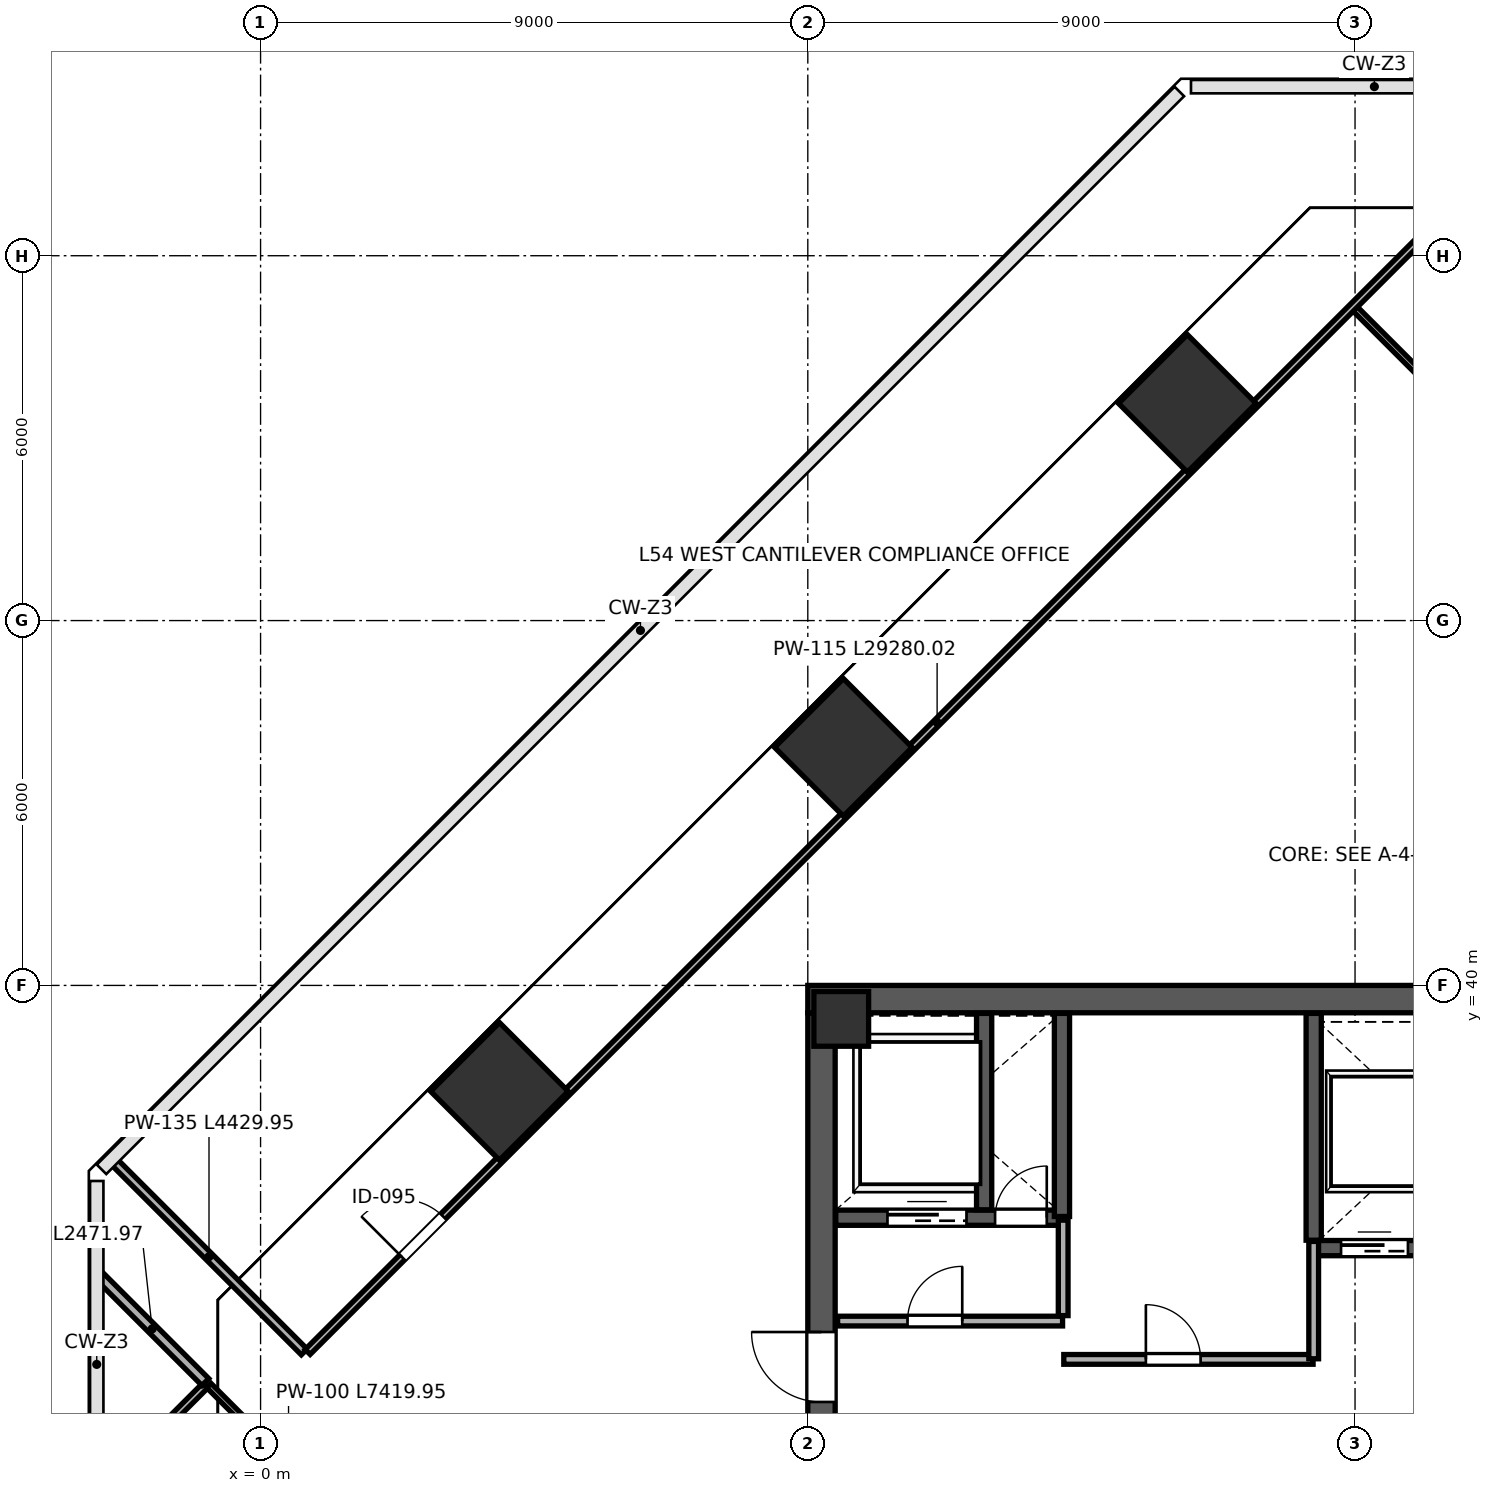
"""IFC4 building model, lengths in metres.
Left out: names, types, materials, properties, quantities, classifications, styles, units other than length and angle.
Written with IfcOpenShell. Run it as: python <this file> out.ifc"""

import sys

from ifc_helpers import new_model, si_unit, direction, frame, frame_2d, origin, origin_2d, place, context, subcontext, project, spatial, rectangle, extrude, source, transform, mapped, element, fill, save


model = new_model("IFC4")
c1 = context("Model", 3, precision=1e-05, world=origin(), true_north=direction((0.0, 1.0)))
c2 = subcontext(c1, "Body", "Model", "MODEL_VIEW")
j1 = project(units=[si_unit("LENGTHUNIT", "METRE"), si_unit("PLANEANGLEUNIT", "RADIAN")], contexts=[c1])
p1 = place(None, origin())
s1 = spatial("IfcSite", under=j1, at=p1, CompositionType="ELEMENT")
p2 = place(p1, origin())
s2 = spatial("IfcBuilding", under=s1, at=p2, CompositionType="ELEMENT")
p3 = place(p2, frame((0.0, 0.0, 241.6)))
s3 = spatial("IfcBuildingStorey", under=s2, at=p3, CompositionType="ELEMENT", Elevation=241.6)
m1 = source(origin(), c2, "Body", "SweptSolid", [
    extrude(rectangle(XDim=0.9, YDim=0.9, at=origin_2d()), origin(), (0.0, 0.0, 1.0), 4.198),
])
p4 = place(p3, frame((9.55, 39.45, 0.001), z_axis=(0.0, 0.0, 1.0), x_axis=(1.0, 0.0, 0.0)))
e1 = element("IfcColumn", 1, at=p4, inside=s3, PredefinedType="COLUMN", context=c2, shape_type="MappedRepresentation", body=[
    mapped(m1, transform((0.0, 0.0, 0.0), scale=1.0)),
])
m2 = source(origin(), c2, "Body", "SweptSolid", [
    extrude(rectangle(XDim=1.6, YDim=1.6, at=origin_2d()), origin(), (0.0, 0.0, 1.0), 4.198),
])
for number, where, z_axis, x_axis in (
    (2, (3.928, 38.258, 0.001), (0.0, 0.0, 1.0), (-0.707, 0.707, 0.0)),
    (3, (9.585, 43.915, 0.001), (0.0, 0.0, 1.0), (-0.707, 0.707, 0.0)),
    (4, (15.242, 49.572, 0.001), (0.0, 0.0, 1.0), (-0.707, 0.707, 0.0)),
):
    element("IfcColumn", number, at=place(p3, frame(where, z_axis=z_axis, x_axis=x_axis)), inside=s3, PredefinedType="COLUMN", context=c2, shape_type="MappedRepresentation", body=[
        mapped(m2, transform((0.0, 0.0, 0.0), scale=1.0)),
    ])
p5 = place(p3, frame((9.225, 24.45, 0.0), z_axis=(0.0, 0.0, 1.0), x_axis=(0.0, 1.0, 0.0)))
e5 = element("IfcWall", 5, at=p5, inside=s3, PredefinedType="SHEAR", context=c2, shape_type="SweptSolid", body=[
    extrude(rectangle(XDim=15.1, YDim=0.45, at=frame_2d((7.55, 0.0))), origin(), (0.0, 0.0, 1.0), 3.96),
])
p6 = place(p5, frame((8.7, 0.0, 0.0)))
e6 = element("IfcOpeningElement", 6, at=p6, cuts=e5, PredefinedType="OPENING", context=c2, shape_type="SweptSolid", body=[
    extrude(rectangle(XDim=1.15, YDim=2.2, at=frame_2d((0.575, 1.1))), frame((0.0, 0.235, 0.0), z_axis=(0.0, -1.0, 0.0), x_axis=(1.0, 0.0, 0.0)), (0.0, 0.0, 1.0), 0.47),
])
p7 = place(p3, frame((9.0, 39.775, 0.0), z_axis=(0.0, 0.0, 1.0), x_axis=(1.0, 0.0, 0.0)))
e7 = element("IfcWall", 7, at=p7, inside=s3, PredefinedType="SHEAR", context=c2, shape_type="SweptSolid", body=[
    extrude(rectangle(XDim=18.0, YDim=0.45, at=frame_2d((9.0, 0.0))), origin(), (0.0, 0.0, 1.0), 3.96),
])
p8 = place(p3, frame((9.46, 36.18, 0.0), z_axis=(0.0, 0.0, 1.0), x_axis=(1.0, 0.0, 0.0)))
e8 = element("IfcWall", 8, at=p8, inside=s3, PredefinedType="SHEAR", context=c2, shape_type="SweptSolid", body=[
    extrude(rectangle(XDim=3.79, YDim=0.25, at=frame_2d((1.895, 0.0))), origin(), (0.0, 0.0, 1.0), 3.96),
])
p9 = place(p8, frame((2.62, 0.0, 0.0)))
e9 = element("IfcOpeningElement", 9, at=p9, cuts=e8, PredefinedType="OPENING", context=c2, shape_type="SweptSolid", body=[
    extrude(rectangle(XDim=0.85, YDim=2.1, at=frame_2d((0.425, 1.05))), frame((0.0, 0.135, 0.0), z_axis=(0.0, -1.0, 0.0), x_axis=(1.0, 0.0, 0.0)), (0.0, 0.0, 1.0), 0.27),
])
p10 = place(p8, frame((0.85, 0.0, 0.0)))
e10 = element("IfcOpeningElement", 10, at=p10, cuts=e8, PredefinedType="OPENING", context=c2, shape_type="SweptSolid", body=[
    extrude(rectangle(XDim=1.3, YDim=2.25, at=frame_2d((0.65, 1.125))), frame((0.0, 0.135, 0.0), z_axis=(0.0, -1.0, 0.0), x_axis=(1.0, 0.0, 0.0)), (0.0, 0.0, 1.0), 0.27),
])
p11 = place(p3, frame((11.9, 36.31, 0.0), z_axis=(0.0, 0.0, 1.0), x_axis=(0.0, 1.0, 0.0)))
e11 = element("IfcWall", 11, at=p11, inside=s3, PredefinedType="SHEAR", context=c2, shape_type="SweptSolid", body=[
    extrude(rectangle(XDim=3.23, YDim=0.25, at=frame_2d((1.615, 0.0))), origin(), (0.0, 0.0, 1.0), 3.96),
])
p12 = place(p3, frame((13.18, 36.2, 0.0), z_axis=(0.0, 0.0, 1.0), x_axis=(0.0, 1.0, 0.0)))
e12 = element("IfcWall", 12, at=p12, inside=s3, PredefinedType="SHEAR", context=c2, shape_type="SweptSolid", body=[
    extrude(rectangle(XDim=3.34, YDim=0.25, at=frame_2d((1.67, 0.0))), origin(), (0.0, 0.0, 1.0), 3.96),
])
p13 = place(p3, frame((17.32, 35.68, 0.0), z_axis=(0.0, 0.0, 1.0), x_axis=(1.0, 0.0, 0.0)))
e13 = element("IfcWall", 13, at=p13, inside=s3, PredefinedType="SHEAR", context=c2, shape_type="SweptSolid", body=[
    extrude(rectangle(XDim=3.87, YDim=0.25, at=frame_2d((1.935, 0.0))), origin(), (0.0, 0.0, 1.0), 3.96),
])
p14 = place(p13, frame((0.45, 0.0, 0.0)))
e14 = element("IfcOpeningElement", 14, at=p14, cuts=e13, PredefinedType="OPENING", context=c2, shape_type="SweptSolid", body=[
    extrude(rectangle(XDim=1.1, YDim=2.2, at=frame_2d((0.55, 1.1))), frame((0.0, 0.135, 0.0), z_axis=(0.0, -1.0, 0.0), x_axis=(1.0, 0.0, 0.0)), (0.0, 0.0, 1.0), 0.27),
])
p15 = place(p13, frame((2.35, 0.0, 0.0)))
e15 = element("IfcOpeningElement", 15, at=p15, cuts=e13, PredefinedType="OPENING", context=c2, shape_type="SweptSolid", body=[
    extrude(rectangle(XDim=1.1, YDim=2.2, at=frame_2d((0.55, 1.1))), frame((0.0, 0.135, 0.0), z_axis=(0.0, -1.0, 0.0), x_axis=(1.0, 0.0, 0.0)), (0.0, 0.0, 1.0), 0.27),
])
p16 = place(p3, frame((17.32, 35.81, 0.0), z_axis=(0.0, 0.0, 1.0), x_axis=(0.0, 1.0, 0.0)))
e16 = element("IfcWall", 16, at=p16, inside=s3, PredefinedType="SHEAR", context=c2, shape_type="SweptSolid", body=[
    extrude(rectangle(XDim=3.73, YDim=0.25, at=frame_2d((1.865, 0.0))), origin(), (0.0, 0.0, 1.0), 3.96),
])
p17 = place(p3, frame((9.49, 34.48, 0.0), z_axis=(0.0, 0.0, 1.0), x_axis=(1.0, 0.0, 0.0)))
e17 = element("IfcWall", 17, at=p17, inside=s3, PredefinedType="PARTITIONING", context=c2, shape_type="SweptSolid", body=[
    extrude(rectangle(XDim=3.7, YDim=0.16, at=frame_2d((1.85, 0.0))), origin(), (0.0, 0.0, 1.0), 3.96),
])
p18 = place(p17, frame((1.15, 0.0, 0.0)))
e18 = element("IfcOpeningElement", 18, at=p18, cuts=e17, PredefinedType="OPENING", context=c2, shape_type="SweptSolid", body=[
    extrude(rectangle(XDim=0.9, YDim=2.15, at=frame_2d((0.45, 1.075))), frame((0.0, 0.09, 0.0), z_axis=(0.0, -1.0, 0.0), x_axis=(1.0, 0.0, 0.0)), (0.0, 0.0, 1.0), 0.18),
])
p19 = place(p3, frame((13.2, 34.57, 0.0), z_axis=(0.0, 0.0, 1.0), x_axis=(0.0, 1.0, 0.0)))
e19 = element("IfcWall", 19, at=p19, inside=s3, PredefinedType="PARTITIONING", context=c2, shape_type="SweptSolid", body=[
    extrude(rectangle(XDim=1.57, YDim=0.16, at=frame_2d((0.785, 0.0))), origin(), (0.0, 0.0, 1.0), 3.96),
])
p20 = place(p3, frame((13.21, 33.85, 0.0), z_axis=(0.0, 0.0, 1.0), x_axis=(1.0, 0.0, 0.0)))
e20 = element("IfcWall", 20, at=p20, inside=s3, PredefinedType="PARTITIONING", context=c2, shape_type="SweptSolid", body=[
    extrude(rectangle(XDim=4.1, YDim=0.16, at=frame_2d((2.05, 0.0))), origin(), (0.0, 0.0, 1.0), 3.96),
])
p21 = place(p20, frame((1.35, 0.0, 0.0)))
e21 = element("IfcOpeningElement", 21, at=p21, cuts=e20, PredefinedType="OPENING", context=c2, shape_type="SweptSolid", body=[
    extrude(rectangle(XDim=0.9, YDim=2.15, at=frame_2d((0.45, 1.075))), frame((0.0, 0.09, 0.0), z_axis=(0.0, -1.0, 0.0), x_axis=(1.0, 0.0, 0.0)), (0.0, 0.0, 1.0), 0.18),
])
p22 = place(p3, frame((17.32, 33.86, 0.0), z_axis=(0.0, 0.0, 1.0), x_axis=(0.0, 1.0, 0.0)))
e22 = element("IfcWall", 22, at=p22, inside=s3, PredefinedType="PARTITIONING", context=c2, shape_type="SweptSolid", body=[
    extrude(rectangle(XDim=1.93, YDim=0.16, at=frame_2d((0.965, 0.0))), origin(), (0.0, 0.0, 1.0), 3.96),
])
p23 = place(p3, frame((-2.656, 31.673, 0.0), z_axis=(0.0, 0.0, 1.0), x_axis=(0.707106781187, 0.707106781187, 0.0)))
e23 = element("IfcWall", 23, at=p23, inside=s3, PredefinedType="PARTITIONING", context=c2, shape_type="SweptSolid", body=[
    extrude(rectangle(XDim=2.472, YDim=0.115, at=frame_2d((1.236, 0.0))), origin(), (0.0, 0.0, 1.0), 3.96),
])
p24 = place(p3, frame((-2.656, 35.226, 0.0), z_axis=(0.0, 0.0, 1.0), x_axis=(0.707106781187, -0.707106781187, 0.0)))
e24 = element("IfcWall", 24, at=p24, inside=s3, PredefinedType="PARTITIONING", context=c2, shape_type="SweptSolid", body=[
    extrude(rectangle(XDim=2.472, YDim=0.16, at=frame_2d((1.236, 0.0))), origin(), (0.0, 0.0, 1.0), 3.96),
])
p25 = place(p3, frame((-0.852, 33.421, 0.0), z_axis=(0.0, 0.0, 1.0), x_axis=(0.707090329382, -0.707123232608, 0.0)))
e25 = element("IfcWall", 25, at=p25, inside=s3, PredefinedType="PARTITIONING", context=c2, shape_type="SweptSolid", body=[
    extrude(rectangle(XDim=7.42, YDim=0.1, at=frame_2d((3.71, 0.0))), origin(), (0.0, 0.0, 1.0), 3.96),
])
p26 = place(p25, frame((2.9, 0.0, 0.0)))
e26 = element("IfcOpeningElement", 26, at=p26, cuts=e25, PredefinedType="OPENING", context=c2, shape_type="SweptSolid", body=[
    extrude(rectangle(XDim=0.9, YDim=2.15, at=frame_2d((0.45, 1.075))), frame((0.0, 0.06, 0.0), z_axis=(0.0, -1.0, 0.0), x_axis=(1.0, 0.0, 0.0)), (0.0, 0.0, 1.0), 0.12),
])
p27 = place(p25, frame((5.0, 0.0, 0.0)))
e27 = element("IfcOpeningElement", 27, at=p27, cuts=e25, PredefinedType="OPENING", context=c2, shape_type="SweptSolid", body=[
    extrude(rectangle(XDim=0.95, YDim=2.15, at=frame_2d((0.475, 1.075))), frame((0.0, 0.06, 0.0), z_axis=(0.0, -1.0, 0.0), x_axis=(1.0, 0.0, 0.0)), (0.0, 0.0, 1.0), 0.12),
])
p28 = place(p3, frame((17.993, 51.134, 0.0), z_axis=(0.0, 0.0, 1.0), x_axis=(0.707106781187, -0.707106781187, 0.0)))
e28 = element("IfcWall", 28, at=p28, inside=s3, PredefinedType="PARTITIONING", context=c2, shape_type="SweptSolid", body=[
    extrude(rectangle(XDim=22.27, YDim=0.1, at=frame_2d((11.135, 0.0))), origin(), (0.0, 0.0, 1.0), 3.96),
])
p29 = place(p28, frame((10.8, 0.0, 0.0)))
e29 = element("IfcOpeningElement", 29, at=p29, cuts=e28, PredefinedType="OPENING", context=c2, shape_type="SweptSolid", body=[
    extrude(rectangle(XDim=0.95, YDim=2.15, at=frame_2d((0.475, 1.075))), frame((0.0, 0.06, 0.0), z_axis=(0.0, -1.0, 0.0), x_axis=(1.0, 0.0, 0.0)), (0.0, 0.0, 1.0), 0.12),
])
p30 = place(p3, frame((-2.414, 37.105, 0.0), z_axis=(0.0, 0.0, 1.0), x_axis=(0.707106781187, -0.707106781187, 0.0)))
e30 = element("IfcWall", 30, at=p30, inside=s3, PredefinedType="PARTITIONING", context=c2, shape_type="SweptSolid", body=[
    extrude(rectangle(XDim=4.43, YDim=0.135, at=frame_2d((2.215, 0.0))), origin(), (0.0, 0.0, 1.0), 3.96),
])
p31 = place(p3, frame((0.775, 33.973, 0.0), z_axis=(0.0, 0.0, 1.0), x_axis=(0.707106781187, 0.707106781187, 0.0)))
e31 = element("IfcWall", 31, at=p31, inside=s3, PredefinedType="PARTITIONING", context=c2, shape_type="SweptSolid", body=[
    extrude(rectangle(XDim=29.28, YDim=0.115, at=frame_2d((14.64, 0.0))), origin(), (0.0, 0.0, 1.0), 3.96),
])
p32 = place(p31, frame((2.2, 0.0, 0.0)))
e32 = element("IfcOpeningElement", 32, at=p32, cuts=e31, PredefinedType="OPENING", context=c2, shape_type="SweptSolid", body=[
    extrude(rectangle(XDim=0.95, YDim=2.15, at=frame_2d((0.475, 1.075))), frame((0.0, 0.067, 0.0), z_axis=(0.0, -1.0, 0.0), x_axis=(1.0, 0.0, 0.0)), (0.0, 0.0, 1.0), 0.135),
])
m3 = source(origin(), c2, "Body", "SweptSolid", [
    extrude(rectangle(XDim=1.15, YDim=2.2, at=frame_2d((0.575, 1.1))), frame((0.0, 0.025, 0.0), z_axis=(0.0, -1.0, 0.0), x_axis=(1.0, 0.0, 0.0)), (0.0, 0.0, 1.0), 0.05),
])
p33 = place(p6, origin())
e33 = element("IfcDoor", 33, at=p33, inside=s3, OperationType="SINGLE_SWING_RIGHT", PredefinedType="DOOR", context=c2, shape_type="MappedRepresentation", body=[
    mapped(m3, transform((0.0, 0.0, 0.0), scale=1.0)),
])
fill(e6, e33)
m4 = source(origin(), c2, "Body", "SweptSolid", [
    extrude(rectangle(XDim=0.85, YDim=2.1, at=frame_2d((0.425, 1.05))), frame((0.0, 0.025, 0.0), z_axis=(0.0, -1.0, 0.0), x_axis=(1.0, 0.0, 0.0)), (0.0, 0.0, 1.0), 0.05),
])
p34 = place(p9, origin())
e34 = element("IfcDoor", 34, at=p34, inside=s3, OperationType="SINGLE_SWING_RIGHT", PredefinedType="DOOR", context=c2, shape_type="MappedRepresentation", body=[
    mapped(m4, transform((0.0, 0.0, 0.0), scale=1.0)),
])
fill(e9, e34)
m5 = source(origin(), c2, "Body", "SweptSolid", [
    extrude(rectangle(XDim=1.1, YDim=2.2, at=frame_2d((0.55, 1.1))), frame((0.0, 0.025, 0.0), z_axis=(0.0, -1.0, 0.0), x_axis=(1.0, 0.0, 0.0)), (0.0, 0.0, 1.0), 0.05),
])
p35 = place(p14, origin())
e35 = element("IfcDoor", 35, at=p35, inside=s3, OperationType="SLIDING_TO_LEFT", PredefinedType="DOOR", context=c2, shape_type="MappedRepresentation", body=[
    mapped(m5, transform((0.0, 0.0, 0.0), scale=1.0)),
])
fill(e14, e35)
m6 = source(origin(), c2, "Body", "SweptSolid", [
    extrude(rectangle(XDim=1.3, YDim=2.25, at=frame_2d((0.65, 1.125))), frame((0.0, 0.025, 0.0), z_axis=(0.0, -1.0, 0.0), x_axis=(1.0, 0.0, 0.0)), (0.0, 0.0, 1.0), 0.05),
])
p36 = place(p10, origin())
e36 = element("IfcDoor", 36, at=p36, inside=s3, OperationType="SLIDING_TO_LEFT", PredefinedType="DOOR", context=c2, shape_type="MappedRepresentation", body=[
    mapped(m6, transform((0.0, 0.0, 0.0), scale=1.0)),
])
fill(e10, e36)
m7 = source(origin(), c2, "Body", "SweptSolid", [
    extrude(rectangle(XDim=0.9, YDim=2.15, at=frame_2d((0.45, 1.075))), frame((0.0, 0.025, 0.0), z_axis=(0.0, -1.0, 0.0), x_axis=(1.0, 0.0, 0.0)), (0.0, 0.0, 1.0), 0.05),
])
p37 = place(p18, origin())
e37 = element("IfcDoor", 37, at=p37, inside=s3, OperationType="SINGLE_SWING_RIGHT", PredefinedType="DOOR", context=c2, shape_type="MappedRepresentation", body=[
    mapped(m7, transform((0.0, 0.0, 0.0), scale=1.0)),
])
fill(e18, e37)
p38 = place(p21, origin())
e38 = element("IfcDoor", 38, at=p38, inside=s3, OperationType="SINGLE_SWING_LEFT", PredefinedType="DOOR", context=c2, shape_type="MappedRepresentation", body=[
    mapped(m7, transform((0.0, 0.0, 0.0), scale=1.0)),
])
fill(e21, e38)
m8 = source(origin(), c2, "Body", "SweptSolid", [
    extrude(rectangle(XDim=0.95, YDim=2.15, at=frame_2d((0.475, 1.075))), frame((0.0, 0.025, 0.0), z_axis=(0.0, -1.0, 0.0), x_axis=(1.0, 0.0, 0.0)), (0.0, 0.0, 1.0), 0.05),
])
p39 = place(p32, origin())
e39 = element("IfcDoor", 39, at=p39, inside=s3, OperationType="SINGLE_SWING_LEFT", PredefinedType="DOOR", context=c2, shape_type="MappedRepresentation", body=[
    mapped(m8, transform((0.0, 0.0, 0.0), scale=1.0)),
])
fill(e32, e39)
save(model, sys.argv[1])
